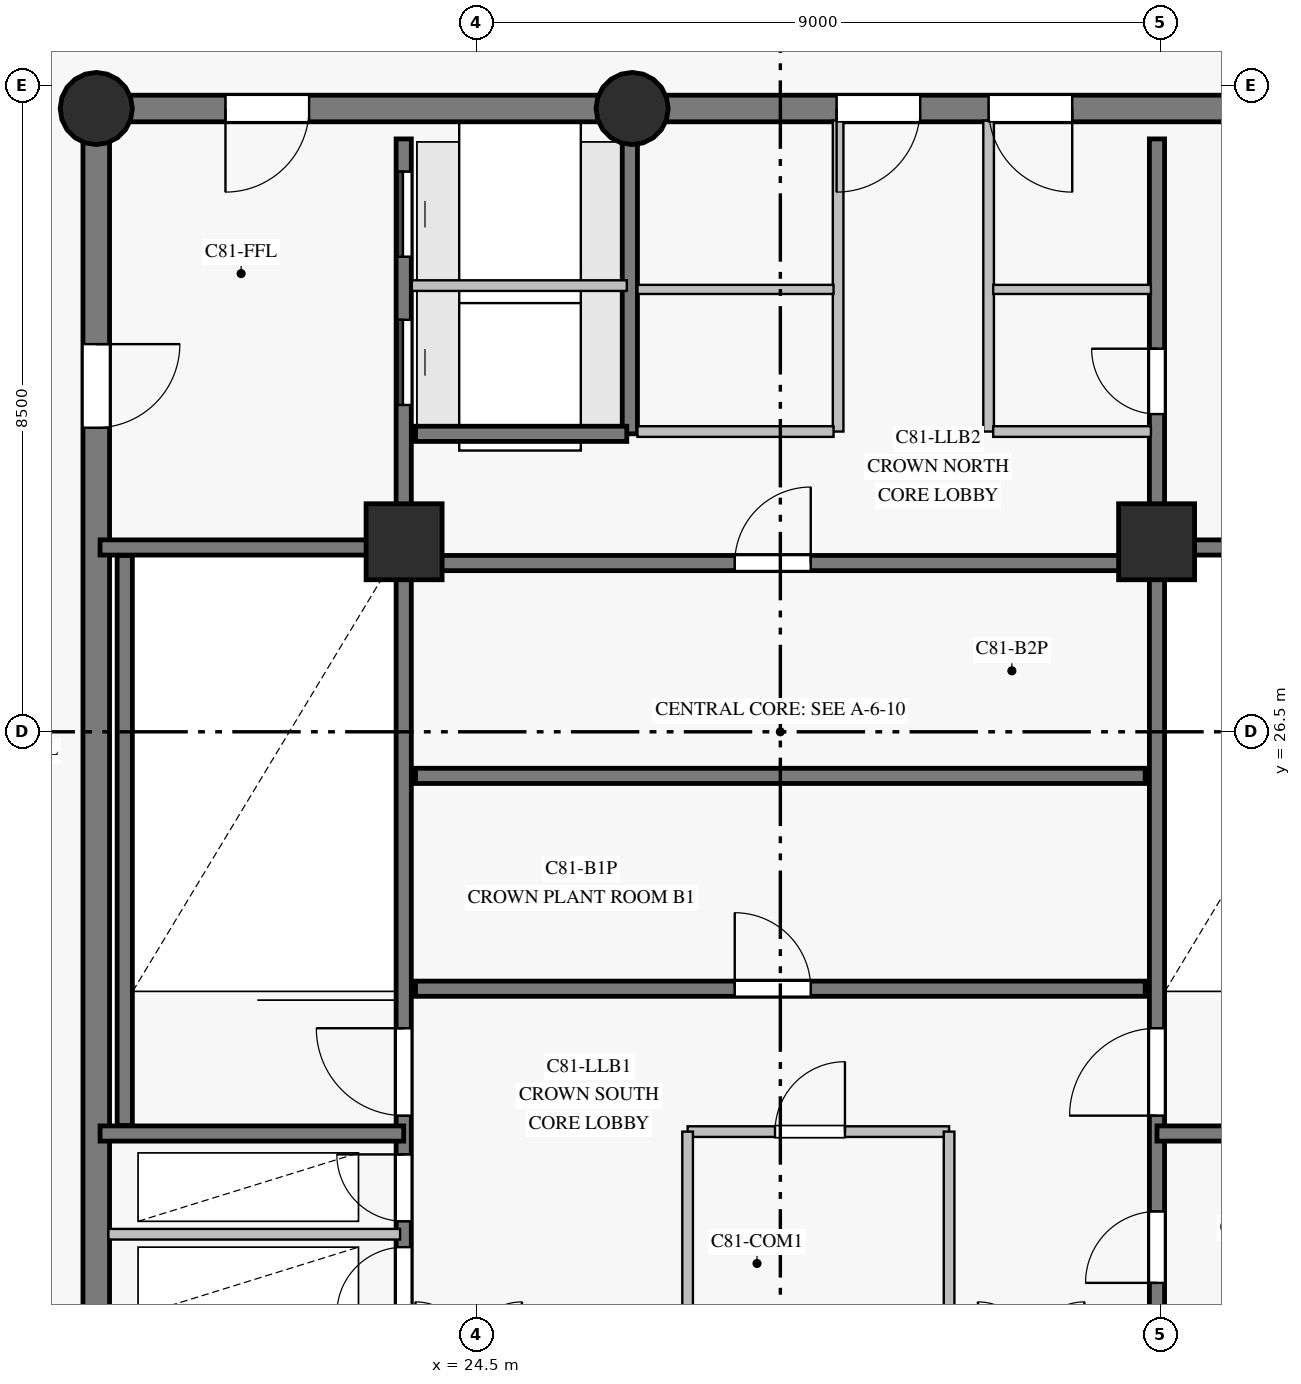
"""IFC4 building model, lengths in metres.
Left out: names, types, materials, properties, quantities, classifications, styles, units other than length and angle.
Written with IfcOpenShell. Run it as: python <this file> out.ifc"""

import sys

from ifc_helpers import new_model, si_unit, direction, frame, frame_2d, origin, origin_with_axes, origin_2d, place, context, subcontext, project, spatial, rectangle, circle, extrude, source, transform, mapped, element, fill, save


model = new_model("IFC4")
c1 = context("Model", 3, precision=1e-05, world=origin(), true_north=direction((0.0, 1.0)))
c2 = subcontext(c1, "Body", "Model", "MODEL_VIEW")
j1 = project(units=[si_unit("LENGTHUNIT", "METRE"), si_unit("PLANEANGLEUNIT", "RADIAN")], contexts=[c1])
p1 = place(None, origin())
s1 = spatial("IfcSite", under=j1, at=p1, CompositionType="ELEMENT")
p2 = place(p1, origin())
s2 = spatial("IfcBuilding", under=s1, at=p2, CompositionType="ELEMENT")
p3 = place(p2, frame((0.0, 0.0, 273.4)))
s3 = spatial("IfcBuildingStorey", under=s2, at=p3, CompositionType="ELEMENT", Elevation=273.4)
p4 = place(p3, frame((37.5, 34.7, 0.0), z_axis=(0.0, 0.0, 1.0), x_axis=(-1.0, 0.0, 0.0)))
e1 = element("IfcWall", 1, at=p4, inside=s3, PredefinedType="SHEAR", context=c2, shape_type="SweptSolid", body=[
    extrude(rectangle(XDim=10.95, YDim=0.35, at=frame_2d((5.475, 0.0))), origin(), (0.0, 0.0, 1.0), 16.35),
])
p5 = place(p4, frame((7.16, 0.0, 0.0)))
e2 = element("IfcOpeningElement", 2, at=p5, cuts=e1, PredefinedType="OPENING", context=c2, shape_type="SweptSolid", body=[
    extrude(rectangle(XDim=1.1, YDim=2.15, at=frame_2d((0.55, 1.075))), frame((0.0, 0.185, 0.0), z_axis=(0.0, -1.0, 0.0), x_axis=(1.0, 0.0, 0.0)), (0.0, 0.0, 1.0), 0.37),
])
p6 = place(p4, frame((5.16, 0.0, 0.0)))
e3 = element("IfcOpeningElement", 3, at=p6, cuts=e1, PredefinedType="OPENING", context=c2, shape_type="SweptSolid", body=[
    extrude(rectangle(XDim=1.1, YDim=2.15, at=frame_2d((0.55, 1.075))), frame((0.0, 0.185, 0.0), z_axis=(0.0, -1.0, 0.0), x_axis=(1.0, 0.0, 0.0)), (0.0, 0.0, 1.0), 0.37),
])
p7 = place(p3, frame((26.55, 34.7, 0.0), z_axis=(0.0, 0.0, 1.0), x_axis=(-1.0, 0.0, 0.0)))
e4 = element("IfcWall", 4, at=p7, inside=s3, PredefinedType="SHEAR", context=c2, shape_type="SweptSolid", body=[
    extrude(rectangle(XDim=7.05, YDim=0.35, at=frame_2d((3.525, 0.0))), origin(), (0.0, 0.0, 1.0), 16.35),
])
p8 = place(p7, frame((4.25, 0.0, 0.0)))
e5 = element("IfcOpeningElement", 5, at=p8, cuts=e4, PredefinedType="OPENING", context=c2, shape_type="SweptSolid", body=[
    extrude(rectangle(XDim=1.1, YDim=2.15, at=frame_2d((0.55, 1.075))), frame((0.0, 0.185, 0.0), z_axis=(0.0, -1.0, 0.0), x_axis=(1.0, 0.0, 0.0)), (0.0, 0.0, 1.0), 0.37),
])
p9 = place(p3, frame((19.5, 34.7, 0.0), z_axis=(0.0, 0.0, 1.0), x_axis=(0.0, -1.0, 0.0)))
e6 = element("IfcWall", 6, at=p9, inside=s3, PredefinedType="SHEAR", context=c2, shape_type="SweptSolid", body=[
    extrude(rectangle(XDim=16.4, YDim=0.35, at=frame_2d((8.2, 0.0))), origin(), (0.0, 0.0, 1.0), 16.35),
])
p10 = place(p9, frame((3.1, 0.0, 0.0)))
e7 = element("IfcOpeningElement", 7, at=p10, cuts=e6, PredefinedType="OPENING", context=c2, shape_type="SweptSolid", body=[
    extrude(rectangle(XDim=1.1, YDim=2.15, at=frame_2d((0.55, 1.075))), frame((0.0, 0.185, 0.0), z_axis=(0.0, -1.0, 0.0), x_axis=(1.0, 0.0, 0.0)), (0.0, 0.0, 1.0), 0.37),
])
m1 = source(origin_with_axes(), c2, "Body", "SweptSolid", [
    extrude(circle(Radius=0.475, at=origin_2d()), origin(), (0.0, 0.0, 1.0), 16.6),
])
for number, where, z_axis, x_axis in (
    (8, (19.5, 34.7, 0.0), (0.0, 0.0, 1.0), (1.0, 0.0, 0.0)),
    (9, (26.55, 34.7, 0.0), (0.0, 0.0, 1.0), (1.0, 0.0, 0.0)),
):
    element("IfcColumn", number, at=place(p3, frame(where, z_axis=z_axis, x_axis=x_axis)), inside=s3, PredefinedType="COLUMN", context=c2, shape_type="MappedRepresentation", body=[
        mapped(m1, transform((0.0, 0.0, 0.0), scale=1.0)),
    ])
m2 = source(origin_with_axes(), c2, "Body", "SweptSolid", [
    extrude(rectangle(XDim=1.0, YDim=1.0, at=origin_2d()), origin(), (0.0, 0.0, 1.0), 16.6),
])
for number, where, z_axis, x_axis in (
    (10, (23.55, 29.0, 0.0), (0.0, 0.0, 1.0), (1.0, 0.0, 0.0)),
    (11, (33.45, 29.0, 0.0), (0.0, 0.0, 1.0), (1.0, 0.0, 0.0)),
):
    element("IfcColumn", number, at=place(p3, frame(where, z_axis=z_axis, x_axis=x_axis)), inside=s3, PredefinedType="COLUMN", context=c2, shape_type="MappedRepresentation", body=[
        mapped(m2, transform((0.0, 0.0, 0.0), scale=1.0)),
    ])
p11 = place(p3, frame((23.545, 18.7, 0.0), z_axis=(0.0, 0.0, 1.0), x_axis=(0.0, 1.0, 0.0)))
e12 = element("IfcWall", 12, at=p11, inside=s3, PredefinedType="SHEAR", context=c2, shape_type="SweptSolid", body=[
    extrude(rectangle(XDim=15.6, YDim=0.2, at=frame_2d((7.8, 0.0))), origin(), (0.0, 0.0, 1.0), 16.35),
])
p12 = place(p11, frame((2.75, 0.0, 0.0)))
e13 = element("IfcOpeningElement", 13, at=p12, cuts=e12, PredefinedType="OPENING", context=c2, shape_type="SweptSolid", body=[
    extrude(rectangle(XDim=1.15, YDim=2.15, at=frame_2d((0.575, 1.075))), frame((0.0, 0.11, 0.0), z_axis=(0.0, -1.0, 0.0), x_axis=(1.0, 0.0, 0.0)), (0.0, 0.0, 1.0), 0.22),
])
p13 = place(p11, frame((0.14, 0.0, 0.0)))
e14 = element("IfcOpeningElement", 14, at=p13, cuts=e12, PredefinedType="OPENING", context=c2, shape_type="SweptSolid", body=[
    extrude(rectangle(XDim=0.88, YDim=2.1, at=frame_2d((0.44, 1.05))), frame((0.0, 0.11, 0.0), z_axis=(0.0, -1.0, 0.0), x_axis=(1.0, 0.0, 0.0)), (0.0, 0.0, 1.0), 0.22),
])
p14 = place(p11, frame((1.36, 0.0, 0.0)))
e15 = element("IfcOpeningElement", 15, at=p14, cuts=e12, PredefinedType="OPENING", context=c2, shape_type="SweptSolid", body=[
    extrude(rectangle(XDim=0.88, YDim=2.1, at=frame_2d((0.44, 1.05))), frame((0.0, 0.11, 0.0), z_axis=(0.0, -1.0, 0.0), x_axis=(1.0, 0.0, 0.0)), (0.0, 0.0, 1.0), 0.22),
])
p15 = place(p11, frame((12.1, 0.0, 0.0)))
e16 = element("IfcOpeningElement", 16, at=p15, cuts=e12, PredefinedType="OPENING", context=c2, shape_type="SweptSolid", body=[
    extrude(rectangle(XDim=1.12, YDim=2.15, at=frame_2d((0.56, 1.075))), frame((0.0, 0.11, 0.0), z_axis=(0.0, -1.0, 0.0), x_axis=(1.0, 0.0, 0.0)), (0.0, 0.0, 1.0), 0.22),
])
p16 = place(p11, frame((14.05, 0.0, 0.0)))
e17 = element("IfcOpeningElement", 17, at=p16, cuts=e12, PredefinedType="OPENING", context=c2, shape_type="SweptSolid", body=[
    extrude(rectangle(XDim=1.12, YDim=2.15, at=frame_2d((0.56, 1.075))), frame((0.0, 0.11, 0.0), z_axis=(0.0, -1.0, 0.0), x_axis=(1.0, 0.0, 0.0)), (0.0, 0.0, 1.0), 0.22),
])
p17 = place(p3, frame((33.455, 18.7, 0.0), z_axis=(0.0, 0.0, 1.0), x_axis=(0.0, 1.0, 0.0)))
e18 = element("IfcWall", 18, at=p17, inside=s3, PredefinedType="SHEAR", context=c2, shape_type="SweptSolid", body=[
    extrude(rectangle(XDim=15.6, YDim=0.2, at=frame_2d((7.8, 0.0))), origin(), (0.0, 0.0, 1.0), 16.35),
])
p18 = place(p17, frame((2.75, 0.0, 0.0)))
e19 = element("IfcOpeningElement", 19, at=p18, cuts=e18, PredefinedType="OPENING", context=c2, shape_type="SweptSolid", body=[
    extrude(rectangle(XDim=1.15, YDim=2.15, at=frame_2d((0.575, 1.075))), frame((0.0, 0.11, 0.0), z_axis=(0.0, -1.0, 0.0), x_axis=(1.0, 0.0, 0.0)), (0.0, 0.0, 1.0), 0.22),
])
p19 = place(p17, frame((0.55, 0.0, 0.0)))
e20 = element("IfcOpeningElement", 20, at=p19, cuts=e18, PredefinedType="OPENING", context=c2, shape_type="SweptSolid", body=[
    extrude(rectangle(XDim=0.94, YDim=2.1, at=frame_2d((0.47, 1.05))), frame((0.0, 0.11, 0.0), z_axis=(0.0, -1.0, 0.0), x_axis=(1.0, 0.0, 0.0)), (0.0, 0.0, 1.0), 0.22),
])
p20 = place(p17, frame((11.98, 0.0, 0.0)))
e21 = element("IfcOpeningElement", 21, at=p20, cuts=e18, PredefinedType="OPENING", context=c2, shape_type="SweptSolid", body=[
    extrude(rectangle(XDim=0.86, YDim=2.04, at=frame_2d((0.43, 1.02))), frame((0.0, 0.11, 0.0), z_axis=(0.0, -1.0, 0.0), x_axis=(1.0, 0.0, 0.0)), (0.0, 0.0, 1.0), 0.22),
])
p21 = place(p3, frame((23.7, 23.12, 0.0), z_axis=(0.0, 0.0, 1.0), x_axis=(1.0, 0.0, 0.0)))
e22 = element("IfcWall", 22, at=p21, inside=s3, PredefinedType="SHEAR", context=c2, shape_type="SweptSolid", body=[
    extrude(rectangle(XDim=9.6, YDim=0.2, at=frame_2d((4.8, 0.0))), origin(), (0.0, 0.0, 1.0), 16.35),
])
p22 = place(p21, frame((4.2, 0.0, 0.0)))
e23 = element("IfcOpeningElement", 23, at=p22, cuts=e22, PredefinedType="OPENING", context=c2, shape_type="SweptSolid", body=[
    extrude(rectangle(XDim=1.0, YDim=2.15, at=frame_2d((0.5, 1.075))), frame((0.0, 0.11, 0.0), z_axis=(0.0, -1.0, 0.0), x_axis=(1.0, 0.0, 0.0)), (0.0, 0.0, 1.0), 0.22),
])
p23 = place(p3, frame((23.7, 25.92, 0.0), z_axis=(0.0, 0.0, 1.0), x_axis=(1.0, 0.0, 0.0)))
e24 = element("IfcWall", 24, at=p23, inside=s3, PredefinedType="SHEAR", context=c2, shape_type="SweptSolid", body=[
    extrude(rectangle(XDim=9.6, YDim=0.2, at=frame_2d((4.8, 0.0))), origin(), (0.0, 0.0, 1.0), 16.35),
])
p24 = place(p3, frame((23.7, 28.72, 0.0), z_axis=(0.0, 0.0, 1.0), x_axis=(1.0, 0.0, 0.0)))
e25 = element("IfcWall", 25, at=p24, inside=s3, PredefinedType="SHEAR", context=c2, shape_type="SweptSolid", body=[
    extrude(rectangle(XDim=9.6, YDim=0.2, at=frame_2d((4.8, 0.0))), origin(), (0.0, 0.0, 1.0), 16.35),
])
p25 = place(p24, frame((4.2, 0.0, 0.0)))
e26 = element("IfcOpeningElement", 26, at=p25, cuts=e25, PredefinedType="OPENING", context=c2, shape_type="SweptSolid", body=[
    extrude(rectangle(XDim=1.0, YDim=2.15, at=frame_2d((0.5, 1.075))), frame((0.0, 0.11, 0.0), z_axis=(0.0, -1.0, 0.0), x_axis=(1.0, 0.0, 0.0)), (0.0, 0.0, 1.0), 0.22),
])
p26 = place(p3, frame((19.875, 21.32, 0.0), z_axis=(0.0, 0.0, 1.0), x_axis=(0.0, 1.0, 0.0)))
e27 = element("IfcWall", 27, at=p26, inside=s3, PredefinedType="SHEAR", context=c2, shape_type="SweptSolid", body=[
    extrude(rectangle(XDim=7.5, YDim=0.2, at=frame_2d((3.75, 0.0))), origin(), (0.0, 0.0, 1.0), 16.35),
])
for number, where, z_axis, x_axis in (
    (28, (33.455, 21.215, 0.0), (0.0, 0.0, 1.0), (1.0, 0.0, 0.0)),
    (29, (33.455, 28.925, 0.0), (0.0, 0.0, 1.0), (1.0, 0.0, 0.0)),
    (30, (19.55, 21.215, 0.0), (0.0, 0.0, 1.0), (1.0, 0.0, 0.0)),
    (31, (19.55, 28.925, 0.0), (0.0, 0.0, 1.0), (1.0, 0.0, 0.0)),
):
    element("IfcWall", number, at=place(p3, frame(where, z_axis=z_axis, x_axis=x_axis)), inside=s3, PredefinedType="SHEAR", context=c2, shape_type="SweptSolid", body=[
        extrude(rectangle(XDim=3.995, YDim=0.2, at=frame_2d((1.998, 0.0))), origin(), (0.0, 0.0, 1.0), 16.35),
    ])
p27 = place(p3, frame((26.52, 30.42, 0.0), z_axis=(0.0, 0.0, 1.0), x_axis=(0.0, 1.0, 0.0)))
e32 = element("IfcWall", 32, at=p27, inside=s3, PredefinedType="SHEAR", context=c2, shape_type="SweptSolid", body=[
    extrude(rectangle(XDim=3.86, YDim=0.2, at=frame_2d((1.93, 0.0))), origin(), (0.0, 0.0, 1.0), 16.35),
])
p28 = place(p3, frame((23.7, 30.42, 0.0), z_axis=(0.0, 0.0, 1.0), x_axis=(1.0, 0.0, 0.0)))
e33 = element("IfcWall", 33, at=p28, inside=s3, PredefinedType="SHEAR", context=c2, shape_type="SweptSolid", body=[
    extrude(rectangle(XDim=2.78, YDim=0.2, at=frame_2d((1.39, 0.0))), origin(), (0.0, 0.0, 1.0), 16.35),
])
for number, where, z_axis, x_axis in (
    (34, (29.26, 30.45, 0.0), (0.0, 0.0, 1.0), (0.0, 1.0, 0.0)),
    (35, (31.24, 30.45, 0.0), (0.0, 0.0, 1.0), (0.0, 1.0, 0.0)),
):
    element("IfcWall", number, at=place(p3, frame(where, z_axis=z_axis, x_axis=x_axis)), inside=s3, PredefinedType="PARTITIONING", context=c2, shape_type="SweptSolid", body=[
        extrude(rectangle(XDim=4.09, YDim=0.14, at=frame_2d((2.045, 0.0))), origin(), (0.0, 0.0, 1.0), 16.35),
    ])
p29 = place(p3, frame((19.66, 19.89, 0.0), z_axis=(0.0, 0.0, 1.0), x_axis=(1.0, 0.0, 0.0)))
e36 = element("IfcWall", 36, at=p29, inside=s3, PredefinedType="PARTITIONING", context=c2, shape_type="SweptSolid", body=[
    extrude(rectangle(XDim=3.837, YDim=0.14, at=frame_2d((1.919, 0.0))), origin(), (0.0, 0.0, 1.0), 16.35),
])
p30 = place(p3, frame((27.28, 21.24, 0.0), z_axis=(0.0, 0.0, 1.0), x_axis=(1.0, 0.0, 0.0)))
e37 = element("IfcWall", 37, at=p30, inside=s3, PredefinedType="PARTITIONING", context=c2, shape_type="SweptSolid", body=[
    extrude(rectangle(XDim=3.44, YDim=0.14, at=frame_2d((1.72, 0.0))), origin(), (0.0, 0.0, 1.0), 16.35),
])
p31 = place(p30, frame((1.15, 0.0, 0.0)))
e38 = element("IfcOpeningElement", 38, at=p31, cuts=e37, PredefinedType="OPENING", context=c2, shape_type="SweptSolid", body=[
    extrude(rectangle(XDim=0.92, YDim=2.1, at=frame_2d((0.46, 1.05))), frame((0.0, 0.08, 0.0), z_axis=(0.0, -1.0, 0.0), x_axis=(1.0, 0.0, 0.0)), (0.0, 0.0, 1.0), 0.16),
])
p32 = place(p3, frame((23.652, 32.37, 0.0), z_axis=(0.0, 0.0, 1.0), x_axis=(1.0, 0.0, 0.0)))
e39 = element("IfcWall", 39, at=p32, inside=s3, PredefinedType="PARTITIONING", context=c2, shape_type="SweptSolid", body=[
    extrude(rectangle(XDim=2.828, YDim=0.14, at=frame_2d((1.414, 0.0))), origin(), (0.0, 0.0, 1.0), 16.35),
])
for number, where, z_axis, x_axis in (
    (40, (27.28, 18.46, 0.0), (0.0, 0.0, 1.0), (0.0, 1.0, 0.0)),
    (41, (30.72, 18.46, 0.0), (0.0, 0.0, 1.0), (0.0, 1.0, 0.0)),
):
    element("IfcWall", number, at=place(p3, frame(where, z_axis=z_axis, x_axis=x_axis)), inside=s3, PredefinedType="PARTITIONING", context=c2, shape_type="SweptSolid", body=[
        extrude(rectangle(XDim=2.78, YDim=0.14, at=frame_2d((1.39, 0.0))), origin(), (0.0, 0.0, 1.0), 16.35),
    ])
p33 = place(p3, frame((26.62, 30.45, 0.0), z_axis=(0.0, 0.0, 1.0), x_axis=(1.0, 0.0, 0.0)))
e42 = element("IfcWall", 42, at=p33, inside=s3, PredefinedType="PARTITIONING", context=c2, shape_type="SweptSolid", body=[
    extrude(rectangle(XDim=2.58, YDim=0.14, at=frame_2d((1.29, 0.0))), origin(), (0.0, 0.0, 1.0), 16.35),
])
p34 = place(p3, frame((26.62, 32.32, 0.0), z_axis=(0.0, 0.0, 1.0), x_axis=(1.0, 0.0, 0.0)))
e43 = element("IfcWall", 43, at=p34, inside=s3, PredefinedType="PARTITIONING", context=c2, shape_type="SweptSolid", body=[
    extrude(rectangle(XDim=2.58, YDim=0.12, at=frame_2d((1.29, 0.0))), origin(), (0.0, 0.0, 1.0), 16.35),
])
p35 = place(p3, frame((31.3, 30.45, 0.0), z_axis=(0.0, 0.0, 1.0), x_axis=(1.0, 0.0, 0.0)))
e44 = element("IfcWall", 44, at=p35, inside=s3, PredefinedType="PARTITIONING", context=c2, shape_type="SweptSolid", body=[
    extrude(rectangle(XDim=2.075, YDim=0.14, at=frame_2d((1.038, 0.0))), origin(), (0.0, 0.0, 1.0), 16.35),
])
p36 = place(p3, frame((31.3, 32.32, 0.0), z_axis=(0.0, 0.0, 1.0), x_axis=(1.0, 0.0, 0.0)))
e45 = element("IfcWall", 45, at=p36, inside=s3, PredefinedType="PARTITIONING", context=c2, shape_type="SweptSolid", body=[
    extrude(rectangle(XDim=2.075, YDim=0.12, at=frame_2d((1.038, 0.0))), origin(), (0.0, 0.0, 1.0), 16.35),
])
m3 = source(origin_with_axes(), c2, "Body", "SweptSolid", [
    extrude(rectangle(XDim=1.15, YDim=2.15, at=frame_2d((0.575, 1.075))), frame((0.0, 0.025, 0.0), z_axis=(0.0, -1.0, 0.0), x_axis=(1.0, 0.0, 0.0)), (0.0, 0.0, 1.0), 0.05),
])
p37 = place(p12, origin())
e46 = element("IfcDoor", 46, at=p37, inside=s3, OperationType="SINGLE_SWING_RIGHT", PredefinedType="DOOR", context=c2, shape_type="MappedRepresentation", body=[
    mapped(m3, transform((0.0, 0.0, 0.0), scale=1.0)),
])
fill(e13, e46)
p38 = place(p18, origin())
e47 = element("IfcDoor", 47, at=p38, inside=s3, OperationType="SINGLE_SWING_LEFT", PredefinedType="DOOR", context=c2, shape_type="MappedRepresentation", body=[
    mapped(m3, transform((0.0, 0.0, 0.0), scale=1.0)),
])
fill(e19, e47)
m4 = source(origin_with_axes(), c2, "Body", "SweptSolid", [
    extrude(rectangle(XDim=1.1, YDim=2.15, at=frame_2d((0.55, 1.075))), frame((0.0, 0.025, 0.0), z_axis=(0.0, -1.0, 0.0), x_axis=(1.0, 0.0, 0.0)), (0.0, 0.0, 1.0), 0.05),
])
p39 = place(p8, origin())
e48 = element("IfcDoor", 48, at=p39, inside=s3, OperationType="SINGLE_SWING_RIGHT", PredefinedType="DOOR", context=c2, shape_type="MappedRepresentation", body=[
    mapped(m4, transform((0.0, 0.0, 0.0), scale=1.0)),
])
fill(e5, e48)
p40 = place(p10, origin())
e49 = element("IfcDoor", 49, at=p40, inside=s3, OperationType="SINGLE_SWING_LEFT", PredefinedType="DOOR", context=c2, shape_type="MappedRepresentation", body=[
    mapped(m4, transform((0.0, 0.0, 0.0), scale=1.0)),
])
fill(e7, e49)
p41 = place(p5, origin())
e50 = element("IfcDoor", 50, at=p41, inside=s3, OperationType="SINGLE_SWING_RIGHT", PredefinedType="DOOR", context=c2, shape_type="MappedRepresentation", body=[
    mapped(m4, transform((0.0, 0.0, 0.0), scale=1.0)),
])
fill(e2, e50)
m5 = source(origin_with_axes(), c2, "Body", "SweptSolid", [
    extrude(rectangle(XDim=0.88, YDim=2.1, at=frame_2d((0.44, 1.05))), frame((0.0, 0.025, 0.0), z_axis=(0.0, -1.0, 0.0), x_axis=(1.0, 0.0, 0.0)), (0.0, 0.0, 1.0), 0.05),
])
p42 = place(p13, origin())
e51 = element("IfcDoor", 51, at=p42, inside=s3, OperationType="SINGLE_SWING_LEFT", PredefinedType="DOOR", context=c2, shape_type="MappedRepresentation", body=[
    mapped(m5, transform((0.0, 0.0, 0.0), scale=1.0)),
])
fill(e14, e51)
p43 = place(p14, origin())
e52 = element("IfcDoor", 52, at=p43, inside=s3, OperationType="SINGLE_SWING_RIGHT", PredefinedType="DOOR", context=c2, shape_type="MappedRepresentation", body=[
    mapped(m5, transform((0.0, 0.0, 0.0), scale=1.0)),
])
fill(e15, e52)
m6 = source(origin_with_axes(), c2, "Body", "SweptSolid", [
    extrude(rectangle(XDim=0.94, YDim=2.1, at=frame_2d((0.47, 1.05))), frame((0.0, 0.025, 0.0), z_axis=(0.0, -1.0, 0.0), x_axis=(1.0, 0.0, 0.0)), (0.0, 0.0, 1.0), 0.05),
])
p44 = place(p19, origin())
e53 = element("IfcDoor", 53, at=p44, inside=s3, OperationType="SINGLE_SWING_LEFT", PredefinedType="DOOR", context=c2, shape_type="MappedRepresentation", body=[
    mapped(m6, transform((0.0, 0.0, 0.0), scale=1.0)),
])
fill(e20, e53)
m7 = source(origin_with_axes(), c2, "Body", "SweptSolid", [
    extrude(rectangle(XDim=0.92, YDim=2.1, at=frame_2d((0.46, 1.05))), frame((0.0, 0.025, 0.0), z_axis=(0.0, -1.0, 0.0), x_axis=(1.0, 0.0, 0.0)), (0.0, 0.0, 1.0), 0.05),
])
p45 = place(p31, origin())
e54 = element("IfcDoor", 54, at=p45, inside=s3, OperationType="SINGLE_SWING_RIGHT", PredefinedType="DOOR", context=c2, shape_type="MappedRepresentation", body=[
    mapped(m7, transform((0.0, 0.0, 0.0), scale=1.0)),
])
fill(e38, e54)
m8 = source(origin_with_axes(), c2, "Body", "SweptSolid", [
    extrude(rectangle(XDim=1.0, YDim=2.15, at=frame_2d((0.5, 1.075))), frame((0.0, 0.025, 0.0), z_axis=(0.0, -1.0, 0.0), x_axis=(1.0, 0.0, 0.0)), (0.0, 0.0, 1.0), 0.05),
])
p46 = place(p22, origin())
e55 = element("IfcDoor", 55, at=p46, inside=s3, OperationType="SINGLE_SWING_LEFT", PredefinedType="DOOR", context=c2, shape_type="MappedRepresentation", body=[
    mapped(m8, transform((0.0, 0.0, 0.0), scale=1.0)),
])
fill(e23, e55)
p47 = place(p25, origin())
e56 = element("IfcDoor", 56, at=p47, inside=s3, OperationType="SINGLE_SWING_RIGHT", PredefinedType="DOOR", context=c2, shape_type="MappedRepresentation", body=[
    mapped(m8, transform((0.0, 0.0, 0.0), scale=1.0)),
])
fill(e26, e56)
p48 = place(p6, origin())
e57 = element("IfcDoor", 57, at=p48, inside=s3, OperationType="SINGLE_SWING_LEFT", PredefinedType="DOOR", context=c2, shape_type="MappedRepresentation", body=[
    mapped(m4, transform((0.0, 0.0, 0.0), scale=1.0)),
])
fill(e3, e57)
m9 = source(origin_with_axes(), c2, "Body", "SweptSolid", [
    extrude(rectangle(XDim=1.12, YDim=2.15, at=frame_2d((0.56, 1.075))), frame((0.0, 0.025, 0.0), z_axis=(0.0, -1.0, 0.0), x_axis=(1.0, 0.0, 0.0)), (0.0, 0.0, 1.0), 0.05),
])
p49 = place(p15, origin())
e58 = element("IfcDoor", 58, at=p49, inside=s3, OperationType="SLIDING_TO_LEFT", PredefinedType="DOOR", context=c2, shape_type="MappedRepresentation", body=[
    mapped(m9, transform((0.0, 0.0, 0.0), scale=1.0)),
])
fill(e16, e58)
p50 = place(p16, origin())
e59 = element("IfcDoor", 59, at=p50, inside=s3, OperationType="SLIDING_TO_RIGHT", PredefinedType="DOOR", context=c2, shape_type="MappedRepresentation", body=[
    mapped(m9, transform((0.0, 0.0, 0.0), scale=1.0)),
])
fill(e17, e59)
m10 = source(origin_with_axes(), c2, "Body", "SweptSolid", [
    extrude(rectangle(XDim=0.86, YDim=2.04, at=frame_2d((0.43, 1.02))), frame((0.0, 0.025, 0.0), z_axis=(0.0, -1.0, 0.0), x_axis=(1.0, 0.0, 0.0)), (0.0, 0.0, 1.0), 0.05),
])
p51 = place(p20, origin())
e60 = element("IfcDoor", 60, at=p51, inside=s3, OperationType="SINGLE_SWING_RIGHT", PredefinedType="DOOR", context=c2, shape_type="MappedRepresentation", body=[
    mapped(m10, transform((0.0, 0.0, 0.0), scale=1.0)),
])
fill(e21, e60)
save(model, sys.argv[1])
